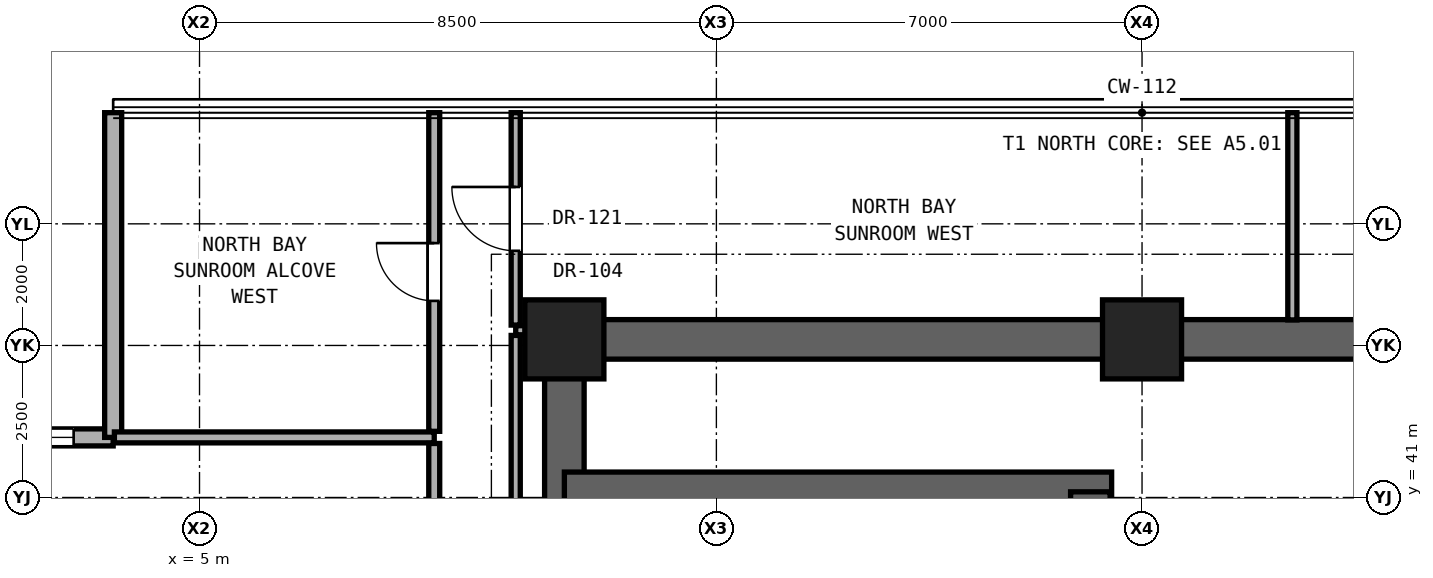
"""IFC4 building model, lengths in metres.
Left out: names, types, materials, properties, quantities, classifications, styles, units other than length and angle.
Written with IfcOpenShell. Run it as: python <this file> out.ifc"""

import sys

from ifc_helpers import new_model, si_unit, direction, frame, frame_2d, origin, origin_2d, place, context, subcontext, project, spatial, rectangle, extrude, element, fill, save


model = new_model("IFC4")
c1 = context("Model", 3, precision=1e-05, world=origin(), true_north=direction((0.0, 1.0)))
c2 = subcontext(c1, "Body", "Model", "MODEL_VIEW")
j1 = project(units=[si_unit("LENGTHUNIT", "METRE"), si_unit("PLANEANGLEUNIT", "RADIAN")], contexts=[c1])
p1 = place(None, origin())
s1 = spatial("IfcSite", under=j1, at=p1, CompositionType="ELEMENT")
p2 = place(p1, origin())
s2 = spatial("IfcBuilding", under=s1, at=p2, CompositionType="ELEMENT")
p3 = place(p2, frame((0.0, 0.0, 71.9)))
s3 = spatial("IfcBuildingStorey", under=s2, at=p3, CompositionType="ELEMENT", Elevation=71.9)
for number, where, z_axis, x_axis in (
    (1, (11.0, 43.6, 0.0), (0.0, 0.0, 1.0), (1.0, 0.0, 0.0)),
    (2, (20.5, 43.6, 0.0), (0.0, 0.0, 1.0), (1.0, 0.0, 0.0)),
):
    element("IfcColumn", number, at=place(p3, frame(where, z_axis=z_axis, x_axis=x_axis)), inside=s3, PredefinedType="COLUMN", context=c2, shape_type="SweptSolid", body=[
        extrude(rectangle(XDim=1.3, YDim=1.3, at=origin_2d()), origin(), (0.0, 0.0, 1.0), 3.3),
    ])
p4 = place(p3, frame((11.0, 43.6, 0.0), z_axis=(0.0, 0.0, 1.0), x_axis=(1.0, 0.0, 0.0)))
e3 = element("IfcWall", 3, at=p4, inside=s3, PredefinedType="SHEAR", context=c2, shape_type="SweptSolid", body=[
    extrude(rectangle(XDim=19.0, YDim=0.65, at=frame_2d((9.5, 0.0))), origin(), (0.0, 0.0, 1.0), 3.06),
])
p5 = place(p3, frame((11.0, 37.6, 0.0), z_axis=(0.0, 0.0, 1.0), x_axis=(0.0, 1.0, 0.0)))
e4 = element("IfcWall", 4, at=p5, inside=s3, PredefinedType="SHEAR", context=c2, shape_type="SweptSolid", body=[
    extrude(rectangle(XDim=6.0, YDim=0.65, at=frame_2d((3.0, 0.0))), origin(), (0.0, 0.0, 1.0), 3.06),
])
p6 = place(p3, frame((11.0, 41.093, 0.0), z_axis=(0.0, 0.0, 1.0), x_axis=(1.0, 0.0, 0.0)))
e5 = element("IfcWall", 5, at=p6, inside=s3, PredefinedType="SHEAR", context=c2, shape_type="SweptSolid", body=[
    extrude(rectangle(XDim=9.0, YDim=0.65, at=frame_2d((4.5, 0.0))), origin(), (0.0, 0.0, 1.0), 3.06),
])
p7 = place(p3, frame((19.65, 37.6, 0.0), z_axis=(0.0, 0.0, 1.0), x_axis=(0.0, 1.0, 0.0)))
e6 = element("IfcWall", 6, at=p7, inside=s3, PredefinedType="SHEAR", context=c2, shape_type="SweptSolid", body=[
    extrude(rectangle(XDim=3.493, YDim=0.65, at=frame_2d((1.747, 0.0))), origin(), (0.0, 0.0, 1.0), 3.06),
])
p8 = place(p3, frame((3.58, 41.988, 0.0), z_axis=(0.0, 0.0, 1.0), x_axis=(-1.0, 0.0, 0.0)))
e7 = element("IfcWall", 7, at=p8, inside=s3, PredefinedType="SOLIDWALL", context=c2, shape_type="SweptSolid", body=[
    extrude(rectangle(XDim=5.34, YDim=0.28, at=frame_2d((2.67, 0.0))), origin(), (0.0, 0.0, 1.0), 3.04),
])
p9 = place(p8, frame((0.65, 0.0, 0.85)))
e8 = element("IfcOpeningElement", 8, at=p9, cuts=e7, PredefinedType="OPENING", context=c2, shape_type="SweptSolid", body=[
    extrude(rectangle(XDim=1.1, YDim=2.0, at=frame_2d((0.55, 1.0))), frame((0.0, 0.15, 0.0), z_axis=(0.0, -1.0, 0.0), x_axis=(1.0, 0.0, 0.0)), (0.0, 0.0, 1.0), 0.3),
])
p10 = place(p3, frame((3.58, 47.328, 0.0), z_axis=(0.0, 0.0, 1.0), x_axis=(0.0, -1.0, 0.0)))
e9 = element("IfcWall", 9, at=p10, inside=s3, PredefinedType="SOLIDWALL", context=c2, shape_type="SweptSolid", body=[
    extrude(rectangle(XDim=5.34, YDim=0.28, at=frame_2d((2.67, 0.0))), origin(), (0.0, 0.0, 1.0), 3.04),
])
p11 = place(p3, frame((3.6, 41.988, 0.0), z_axis=(0.0, 0.0, 1.0), x_axis=(1.0, 0.0, 0.0)))
e10 = element("IfcWall", 10, at=p11, inside=s3, PredefinedType="PARTITIONING", context=c2, shape_type="SweptSolid", body=[
    extrude(rectangle(XDim=5.26, YDim=0.18, at=frame_2d((2.63, 0.0))), origin(), (0.0, 0.0, 1.0), 3.06),
])
p12 = place(p3, frame((10.2, 43.75, 0.0), z_axis=(0.0, 0.0, 1.0), x_axis=(1.0, 0.0, 0.0)))
e11 = element("IfcWall", 11, at=p12, inside=s3, PredefinedType="PARTITIONING", context=c2, shape_type="SweptSolid", body=[
    extrude(rectangle(XDim=0.48, YDim=0.15, at=frame_2d((0.24, 0.0))), origin(), (0.0, 0.0, 1.0), 3.06),
])
p13 = place(p3, frame((8.86, 27.2, 0.0), z_axis=(0.0, 0.0, 1.0), x_axis=(0.0, 1.0, 0.0)))
e12 = element("IfcWall", 12, at=p13, inside=s3, PredefinedType="PARTITIONING", context=c2, shape_type="SweptSolid", body=[
    extrude(rectangle(XDim=14.688, YDim=0.18, at=frame_2d((7.344, 0.0))), origin(), (0.0, 0.0, 1.0), 2.279),
])
p14 = place(p13, frame((6.819, 0.0, 0.0)))
e13 = element("IfcOpeningElement", 13, at=p14, cuts=e12, PredefinedType="OPENING", context=c2, shape_type="SweptSolid", body=[
    extrude(rectangle(XDim=1.05, YDim=2.2, at=frame_2d((0.525, 1.1))), frame((0.0, 0.1, 0.0), z_axis=(0.0, -1.0, 0.0), x_axis=(1.0, 0.0, 0.0)), (0.0, 0.0, 1.0), 0.2),
])
p15 = place(p3, frame((8.86, 42.088, 0.0), z_axis=(0.0, 0.0, 1.0), x_axis=(0.0, 1.0, 0.0)))
e14 = element("IfcWall", 14, at=p15, inside=s3, PredefinedType="PARTITIONING", context=c2, shape_type="SweptSolid", body=[
    extrude(rectangle(XDim=5.24, YDim=0.18, at=frame_2d((2.62, 0.0))), origin(), (0.0, 0.0, 1.0), 3.06),
])
p16 = place(p15, frame((2.145, 0.0, 0.0)))
e15 = element("IfcOpeningElement", 15, at=p16, cuts=e14, PredefinedType="OPENING", context=c2, shape_type="SweptSolid", body=[
    extrude(rectangle(XDim=0.95, YDim=2.15, at=frame_2d((0.475, 1.075))), frame((0.0, 0.1, 0.0), z_axis=(0.0, -1.0, 0.0), x_axis=(1.0, 0.0, 0.0)), (0.0, 0.0, 1.0), 0.2),
])
p17 = place(p3, frame((10.2, 34.535, 0.0), z_axis=(0.0, 0.0, 1.0), x_axis=(0.0, 1.0, 0.0)))
e16 = element("IfcWall", 16, at=p17, inside=s3, PredefinedType="PARTITIONING", context=c2, shape_type="SweptSolid", body=[
    extrude(rectangle(XDim=9.13, YDim=0.15, at=frame_2d((4.565, 0.0))), origin(), (0.0, 0.0, 1.0), 2.436),
])
p18 = place(p3, frame((10.2, 43.835, 0.0), z_axis=(0.0, 0.0, 1.0), x_axis=(0.0, 1.0, 0.0)))
e17 = element("IfcWall", 17, at=p18, inside=s3, PredefinedType="PARTITIONING", context=c2, shape_type="SweptSolid", body=[
    extrude(rectangle(XDim=3.493, YDim=0.15, at=frame_2d((1.747, 0.0))), origin(), (0.0, 0.0, 1.0), 3.06),
])
p19 = place(p18, frame((1.221, 0.0, 0.0)))
e18 = element("IfcOpeningElement", 18, at=p19, cuts=e17, PredefinedType="OPENING", context=c2, shape_type="SweptSolid", body=[
    extrude(rectangle(XDim=1.05, YDim=2.2, at=frame_2d((0.525, 1.1))), frame((0.0, 0.085, 0.0), z_axis=(0.0, -1.0, 0.0), x_axis=(1.0, 0.0, 0.0)), (0.0, 0.0, 1.0), 0.17),
])
p20 = place(p3, frame((22.972, 43.92, 0.0), z_axis=(0.0, 0.0, 1.0), x_axis=(0.0, 1.0, 0.0)))
e19 = element("IfcWall", 19, at=p20, inside=s3, PredefinedType="PARTITIONING", context=c2, shape_type="SweptSolid", body=[
    extrude(rectangle(XDim=3.408, YDim=0.15, at=frame_2d((1.704, 0.0))), origin(), (0.0, 0.0, 1.0), 3.06),
])
p21 = place(p9, origin())
e20 = element("IfcWindow", 20, at=p21, inside=s3, PartitioningType="SINGLE_PANEL", PredefinedType="WINDOW", context=c2, shape_type="SweptSolid", body=[
    extrude(rectangle(XDim=1.1, YDim=2.0, at=frame_2d((0.55, 1.0))), frame((0.0, 0.03, 0.0), z_axis=(0.0, -1.0, 0.0), x_axis=(1.0, 0.0, 0.0)), (0.0, 0.0, 1.0), 0.06),
])
fill(e8, e20)
p22 = place(p19, origin())
e21 = element("IfcDoor", 21, at=p22, inside=s3, OperationType="SINGLE_SWING_RIGHT", PredefinedType="DOOR", context=c2, shape_type="SweptSolid", body=[
    extrude(rectangle(XDim=1.05, YDim=2.2, at=frame_2d((0.525, 1.1))), frame((0.0, 0.025, 0.0), z_axis=(0.0, -1.0, 0.0), x_axis=(1.0, 0.0, 0.0)), (0.0, 0.0, 1.0), 0.05),
])
fill(e18, e21)
p23 = place(p16, origin())
e22 = element("IfcDoor", 22, at=p23, inside=s3, OperationType="SINGLE_SWING_RIGHT", PredefinedType="DOOR", context=c2, shape_type="SweptSolid", body=[
    extrude(rectangle(XDim=0.95, YDim=2.15, at=frame_2d((0.475, 1.075))), frame((0.0, 0.025, 0.0), z_axis=(0.0, -1.0, 0.0), x_axis=(1.0, 0.0, 0.0)), (0.0, 0.0, 1.0), 0.05),
])
fill(e15, e22)
save(model, sys.argv[1])
